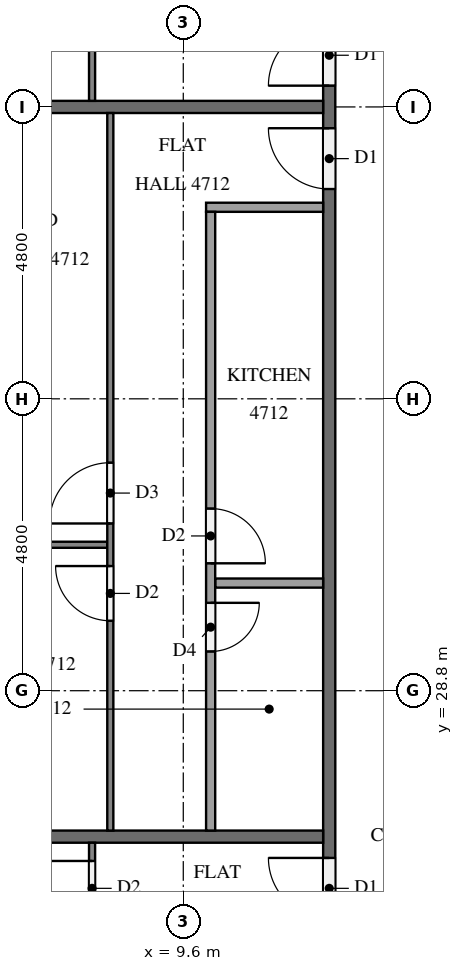
"""IFC4 building model, lengths in metres.
Left out: names, types, materials, properties, quantities, classifications, styles, units other than length and angle.
Written with IfcOpenShell. Run it as: python <this file> out.ifc"""

import sys

from ifc_helpers import new_model, si_unit, direction, frame, frame_2d, origin, place, context, subcontext, project, spatial, rectangle, extrude, element, fill, save


model = new_model("IFC4")
c1 = context("Model", 3, precision=1e-05, world=origin(), true_north=direction((0.0, 1.0)))
c2 = subcontext(c1, "Body", "Model", "MODEL_VIEW")
j1 = project(units=[si_unit("LENGTHUNIT", "METRE"), si_unit("PLANEANGLEUNIT", "RADIAN")], contexts=[c1])
p1 = place(None, origin())
s1 = spatial("IfcSite", under=j1, at=p1, CompositionType="ELEMENT")
p2 = place(p1, origin())
s2 = spatial("IfcBuilding", under=s1, at=p2, CompositionType="ELEMENT")
p3 = place(p2, frame((0.0, 0.0, 182.4)))
s3 = spatial("IfcBuildingStorey", under=s2, at=p3, CompositionType="ELEMENT", Elevation=182.4)
p4 = place(p3, frame((12.0, 12.1, 0.0), z_axis=(0.0, 0.0, 1.0), x_axis=(0.0, 1.0, 0.0)))
e1 = element("IfcWall", 1, at=p4, inside=s3, PredefinedType="PARTITIONING", context=c2, shape_type="SweptSolid", body=[
    extrude(rectangle(XDim=28.6, YDim=0.2, at=frame_2d((14.3, 0.0))), origin(), (0.0, 0.0, 1.0), 3.2),
])
p5 = place(p4, frame((26.65, 0.0, 0.0)))
e2 = element("IfcOpeningElement", 2, at=p5, cuts=e1, PredefinedType="OPENING", context=c2, shape_type="SweptSolid", body=[
    extrude(rectangle(XDim=1.0, YDim=2.1, at=frame_2d((0.5, 1.05))), frame((0.0, 0.11, 0.0), z_axis=(0.0, -1.0, 0.0), x_axis=(1.0, 0.0, 0.0)), (0.0, 0.0, 1.0), 0.22),
])
p6 = place(p4, frame((24.95, 0.0, 0.0)))
e3 = element("IfcOpeningElement", 3, at=p6, cuts=e1, PredefinedType="OPENING", context=c2, shape_type="SweptSolid", body=[
    extrude(rectangle(XDim=1.0, YDim=2.1, at=frame_2d((0.5, 1.05))), frame((0.0, 0.11, 0.0), z_axis=(0.0, -1.0, 0.0), x_axis=(1.0, 0.0, 0.0)), (0.0, 0.0, 1.0), 0.22),
])
p7 = place(p4, frame((12.95, 0.0, 0.0)))
e4 = element("IfcOpeningElement", 4, at=p7, cuts=e1, PredefinedType="OPENING", context=c2, shape_type="SweptSolid", body=[
    extrude(rectangle(XDim=1.0, YDim=2.1, at=frame_2d((0.5, 1.05))), frame((0.0, 0.11, 0.0), z_axis=(0.0, -1.0, 0.0), x_axis=(1.0, 0.0, 0.0)), (0.0, 0.0, 1.0), 0.22),
])
for number, where, z_axis, x_axis in (
    (5, (4.9, 38.4, 0.0), (0.0, 0.0, 1.0), (1.0, 0.0, 0.0)),
    (6, (4.9, 26.4, 0.0), (0.0, 0.0, 1.0), (1.0, 0.0, 0.0)),
):
    element("IfcWall", number, at=place(p3, frame(where, z_axis=z_axis, x_axis=x_axis)), inside=s3, PredefinedType="PARTITIONING", context=c2, shape_type="SweptSolid", body=[
        extrude(rectangle(XDim=7.0, YDim=0.2, at=frame_2d((3.5, 0.0))), origin(), (0.0, 0.0, 1.0), 3.2),
    ])
p8 = place(p3, frame((8.1, 38.5, 0.0), z_axis=(0.0, 0.0, 1.0), x_axis=(0.0, 1.0, 0.0)))
e7 = element("IfcWall", 7, at=p8, inside=s3, PredefinedType="PARTITIONING", context=c2, shape_type="SweptSolid", body=[
    extrude(rectangle(XDim=8.998, YDim=0.1, at=frame_2d((4.499, 0.0))), origin(), (0.0, 0.0, 1.0), 3.2),
])
p9 = place(p8, frame((3.35, 0.0, 0.0)))
e8 = element("IfcOpeningElement", 8, at=p9, cuts=e7, PredefinedType="OPENING", context=c2, shape_type="SweptSolid", body=[
    extrude(rectangle(XDim=1.0, YDim=2.1, at=frame_2d((0.5, 1.05))), frame((0.0, 0.06, 0.0), z_axis=(0.0, -1.0, 0.0), x_axis=(1.0, 0.0, 0.0)), (0.0, 0.0, 1.0), 0.12),
])
p10 = place(p8, frame((5.05, 0.0, 0.0)))
e9 = element("IfcOpeningElement", 9, at=p10, cuts=e7, PredefinedType="OPENING", context=c2, shape_type="SweptSolid", body=[
    extrude(rectangle(XDim=0.9, YDim=2.1, at=frame_2d((0.45, 1.05))), frame((0.0, 0.06, 0.0), z_axis=(0.0, -1.0, 0.0), x_axis=(1.0, 0.0, 0.0)), (0.0, 0.0, 1.0), 0.12),
])
p11 = place(p3, frame((8.35, 31.2, 0.0), z_axis=(0.0, 0.0, 1.0), x_axis=(-1.0, 0.0, 0.0)))
e10 = element("IfcWall", 10, at=p11, inside=s3, PredefinedType="PARTITIONING", context=c2, shape_type="SweptSolid", body=[
    extrude(rectangle(XDim=3.45, YDim=0.1, at=frame_2d((1.725, 0.0))), origin(), (0.0, 0.0, 1.0), 3.2),
])
p12 = place(p3, frame((8.4, 26.5, 0.0), z_axis=(0.0, 0.0, 1.0), x_axis=(0.0, 1.0, 0.0)))
e11 = element("IfcWall", 11, at=p12, inside=s3, PredefinedType="PARTITIONING", context=c2, shape_type="SweptSolid", body=[
    extrude(rectangle(XDim=11.8, YDim=0.1, at=frame_2d((5.9, 0.0))), origin(), (0.0, 0.0, 1.0), 3.2),
])
p13 = place(p12, frame((5.05, 0.0, 0.0)))
e12 = element("IfcOpeningElement", 12, at=p13, cuts=e11, PredefinedType="OPENING", context=c2, shape_type="SweptSolid", body=[
    extrude(rectangle(XDim=1.0, YDim=2.1, at=frame_2d((0.5, 1.05))), frame((0.0, 0.06, 0.0), z_axis=(0.0, -1.0, 0.0), x_axis=(1.0, 0.0, 0.0)), (0.0, 0.0, 1.0), 0.12),
])
p14 = place(p12, frame((3.45, 0.0, 0.0)))
e13 = element("IfcOpeningElement", 13, at=p14, cuts=e11, PredefinedType="OPENING", context=c2, shape_type="SweptSolid", body=[
    extrude(rectangle(XDim=0.9, YDim=2.1, at=frame_2d((0.45, 1.05))), frame((0.0, 0.06, 0.0), z_axis=(0.0, -1.0, 0.0), x_axis=(1.0, 0.0, 0.0)), (0.0, 0.0, 1.0), 0.12),
])
p15 = place(p3, frame((11.9, 30.57, 0.0), z_axis=(0.0, 0.0, 1.0), x_axis=(-1.0, 0.0, 0.0)))
e14 = element("IfcWall", 14, at=p15, inside=s3, PredefinedType="PARTITIONING", context=c2, shape_type="SweptSolid", body=[
    extrude(rectangle(XDim=1.775, YDim=0.15, at=frame_2d((0.887, 0.0))), origin(), (0.0, 0.0, 1.0), 3.2),
])
p16 = place(p3, frame((11.9, 36.75, 0.0), z_axis=(0.0, 0.0, 1.0), x_axis=(-1.0, 0.0, 0.0)))
e15 = element("IfcWall", 15, at=p16, inside=s3, PredefinedType="PARTITIONING", context=c2, shape_type="SweptSolid", body=[
    extrude(rectangle(XDim=1.925, YDim=0.15, at=frame_2d((0.962, 0.0))), origin(), (0.0, 0.0, 1.0), 3.2),
])
p17 = place(p3, frame((10.05, 36.675, 0.0), z_axis=(0.0, 0.0, 1.0), x_axis=(0.0, -1.0, 0.0)))
e16 = element("IfcWall", 16, at=p17, inside=s3, PredefinedType="PARTITIONING", context=c2, shape_type="SweptSolid", body=[
    extrude(rectangle(XDim=10.175, YDim=0.15, at=frame_2d((5.087, 0.0))), origin(), (0.0, 0.0, 1.0), 3.2),
])
p18 = place(p17, frame((4.88, 0.0, 0.0)))
e17 = element("IfcOpeningElement", 17, at=p18, cuts=e16, PredefinedType="OPENING", context=c2, shape_type="SweptSolid", body=[
    extrude(rectangle(XDim=0.9, YDim=2.1, at=frame_2d((0.45, 1.05))), frame((0.0, 0.085, 0.0), z_axis=(0.0, -1.0, 0.0), x_axis=(1.0, 0.0, 0.0)), (0.0, 0.0, 1.0), 0.17),
])
p19 = place(p17, frame((6.43, 0.0, 0.0)))
e18 = element("IfcOpeningElement", 18, at=p19, cuts=e16, PredefinedType="OPENING", context=c2, shape_type="SweptSolid", body=[
    extrude(rectangle(XDim=0.8, YDim=2.1, at=frame_2d((0.4, 1.05))), frame((0.0, 0.085, 0.0), z_axis=(0.0, -1.0, 0.0), x_axis=(1.0, 0.0, 0.0)), (0.0, 0.0, 1.0), 0.17),
])
p20 = place(p3, frame((8.1, 12.1, 0.0), z_axis=(0.0, 0.0, 1.0), x_axis=(0.0, 1.0, 0.0)))
e19 = element("IfcWall", 19, at=p20, inside=s3, PredefinedType="PARTITIONING", context=c2, shape_type="SweptSolid", body=[
    extrude(rectangle(XDim=14.2, YDim=0.1, at=frame_2d((7.1, 0.0))), origin(), (0.0, 0.0, 1.0), 3.2),
])
p21 = place(p20, frame((13.0, 0.0, 0.0)))
e20 = element("IfcOpeningElement", 20, at=p21, cuts=e19, PredefinedType="OPENING", context=c2, shape_type="SweptSolid", body=[
    extrude(rectangle(XDim=0.9, YDim=2.1, at=frame_2d((0.45, 1.05))), frame((0.0, 0.06, 0.0), z_axis=(0.0, -1.0, 0.0), x_axis=(1.0, 0.0, 0.0)), (0.0, 0.0, 1.0), 0.12),
])
p22 = place(p20, frame((5.05, 0.0, 0.0)))
e21 = element("IfcOpeningElement", 21, at=p22, cuts=e19, PredefinedType="OPENING", context=c2, shape_type="SweptSolid", body=[
    extrude(rectangle(XDim=1.0, YDim=2.1, at=frame_2d((0.5, 1.05))), frame((0.0, 0.06, 0.0), z_axis=(0.0, -1.0, 0.0), x_axis=(1.0, 0.0, 0.0)), (0.0, 0.0, 1.0), 0.12),
])
p23 = place(p20, frame((3.45, 0.0, 0.0)))
e22 = element("IfcOpeningElement", 22, at=p23, cuts=e19, PredefinedType="OPENING", context=c2, shape_type="SweptSolid", body=[
    extrude(rectangle(XDim=0.9, YDim=2.1, at=frame_2d((0.45, 1.05))), frame((0.0, 0.06, 0.0), z_axis=(0.0, -1.0, 0.0), x_axis=(1.0, 0.0, 0.0)), (0.0, 0.0, 1.0), 0.12),
])
p24 = place(p5, origin())
e23 = element("IfcDoor", 23, at=p24, inside=s3, OperationType="SINGLE_SWING_LEFT", PredefinedType="DOOR", context=c2, shape_type="SweptSolid", body=[
    extrude(rectangle(XDim=1.0, YDim=2.1, at=frame_2d((0.5, 1.05))), frame((0.0, 0.025, 0.0), z_axis=(0.0, -1.0, 0.0), x_axis=(1.0, 0.0, 0.0)), (0.0, 0.0, 1.0), 0.05),
])
fill(e2, e23)
p25 = place(p6, origin())
e24 = element("IfcDoor", 24, at=p25, inside=s3, OperationType="SINGLE_SWING_RIGHT", PredefinedType="DOOR", context=c2, shape_type="SweptSolid", body=[
    extrude(rectangle(XDim=1.0, YDim=2.1, at=frame_2d((0.5, 1.05))), frame((0.0, 0.025, 0.0), z_axis=(0.0, -1.0, 0.0), x_axis=(1.0, 0.0, 0.0)), (0.0, 0.0, 1.0), 0.05),
])
fill(e3, e24)
p26 = place(p7, origin())
e25 = element("IfcDoor", 25, at=p26, inside=s3, OperationType="SINGLE_SWING_RIGHT", PredefinedType="DOOR", context=c2, shape_type="SweptSolid", body=[
    extrude(rectangle(XDim=1.0, YDim=2.1, at=frame_2d((0.5, 1.05))), frame((0.0, 0.025, 0.0), z_axis=(0.0, -1.0, 0.0), x_axis=(1.0, 0.0, 0.0)), (0.0, 0.0, 1.0), 0.05),
])
fill(e4, e25)
p27 = place(p13, origin())
e26 = element("IfcDoor", 26, at=p27, inside=s3, OperationType="SINGLE_SWING_LEFT", PredefinedType="DOOR", context=c2, shape_type="SweptSolid", body=[
    extrude(rectangle(XDim=1.0, YDim=2.1, at=frame_2d((0.5, 1.05))), frame((0.0, 0.025, 0.0), z_axis=(0.0, -1.0, 0.0), x_axis=(1.0, 0.0, 0.0)), (0.0, 0.0, 1.0), 0.05),
])
fill(e12, e26)
p28 = place(p14, origin())
e27 = element("IfcDoor", 27, at=p28, inside=s3, OperationType="SINGLE_SWING_RIGHT", PredefinedType="DOOR", context=c2, shape_type="SweptSolid", body=[
    extrude(rectangle(XDim=0.9, YDim=2.1, at=frame_2d((0.45, 1.05))), frame((0.0, 0.025, 0.0), z_axis=(0.0, -1.0, 0.0), x_axis=(1.0, 0.0, 0.0)), (0.0, 0.0, 1.0), 0.05),
])
fill(e13, e27)
p29 = place(p18, origin())
e28 = element("IfcDoor", 28, at=p29, inside=s3, OperationType="SINGLE_SWING_RIGHT", PredefinedType="DOOR", context=c2, shape_type="SweptSolid", body=[
    extrude(rectangle(XDim=0.9, YDim=2.1, at=frame_2d((0.45, 1.05))), frame((0.0, 0.025, 0.0), z_axis=(0.0, -1.0, 0.0), x_axis=(1.0, 0.0, 0.0)), (0.0, 0.0, 1.0), 0.05),
])
fill(e17, e28)
p30 = place(p19, origin())
e29 = element("IfcDoor", 29, at=p30, inside=s3, OperationType="SINGLE_SWING_LEFT", PredefinedType="DOOR", context=c2, shape_type="SweptSolid", body=[
    extrude(rectangle(XDim=0.8, YDim=2.1, at=frame_2d((0.4, 1.05))), frame((0.0, 0.025, 0.0), z_axis=(0.0, -1.0, 0.0), x_axis=(1.0, 0.0, 0.0)), (0.0, 0.0, 1.0), 0.05),
])
fill(e18, e29)
p31 = place(p21, origin())
e30 = element("IfcDoor", 30, at=p31, inside=s3, OperationType="SINGLE_SWING_RIGHT", PredefinedType="DOOR", context=c2, shape_type="SweptSolid", body=[
    extrude(rectangle(XDim=0.9, YDim=2.1, at=frame_2d((0.45, 1.05))), frame((0.0, 0.025, 0.0), z_axis=(0.0, -1.0, 0.0), x_axis=(1.0, 0.0, 0.0)), (0.0, 0.0, 1.0), 0.05),
])
fill(e20, e30)
save(model, sys.argv[1])
